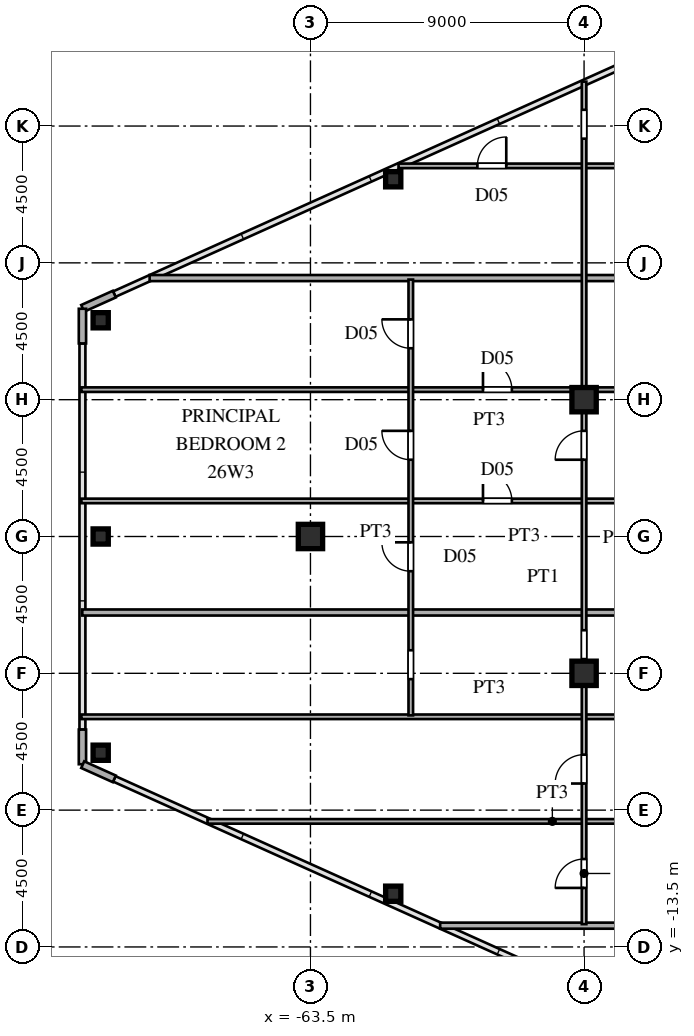
"""IFC4 building model, lengths in metres.
Left out: names, types, materials, properties, quantities, classifications, styles, units other than length and angle.
Written with IfcOpenShell. Run it as: python <this file> out.ifc"""

import sys

from ifc_helpers import new_model, si_unit, direction, frame, frame_2d, origin, origin_2d, place, context, subcontext, project, spatial, rectangle, hollow_rectangle, i_section, extrude, source, transform, mapped, element, fill, save


model = new_model("IFC4")
c1 = context("Model", 3, precision=1e-05, world=origin(), true_north=direction((0.0, 1.0)))
c2 = subcontext(c1, "Body", "Model", "MODEL_VIEW")
j1 = project(units=[si_unit("LENGTHUNIT", "METRE"), si_unit("PLANEANGLEUNIT", "RADIAN")], contexts=[c1])
p1 = place(None, origin())
s1 = spatial("IfcSite", under=j1, at=p1, CompositionType="ELEMENT")
p2 = place(p1, origin())
s2 = spatial("IfcBuilding", under=s1, at=p2, CompositionType="ELEMENT")
p3 = place(p2, frame((0.0, 0.0, 99.6)))
s3 = spatial("IfcBuildingStorey", under=s2, at=p3, CompositionType="ELEMENT", Elevation=99.6)
m1 = source(origin(), c2, "Body", "SweptSolid", [
    extrude(i_section(OverallWidth=0.8, OverallDepth=0.8, WebThickness=0.032, FlangeThickness=0.05, at=origin_2d()), origin(), (0.0, 0.0, 1.0), 3.6),
])
for number, where, z_axis, x_axis in (
    (1, (-54.5, -4.5, 0.0), (0.0, 0.0, 1.0), (1.0, 0.0, 0.0)),
    (2, (-54.5, 4.5, 0.0), (0.0, 0.0, 1.0), (1.0, 0.0, 0.0)),
    (3, (-63.5, 0.0, 0.0), (0.0, 0.0, 1.0), (1.0, 0.0, 0.0)),
):
    element("IfcColumn", number, at=place(p3, frame(where, z_axis=z_axis, x_axis=x_axis)), inside=s3, PredefinedType="COLUMN", context=c2, shape_type="MappedRepresentation", body=[
        mapped(m1, transform((0.0, 0.0, 0.0), scale=1.0)),
    ])
m2 = source(origin(), c2, "Body", "SweptSolid", [
    extrude(hollow_rectangle(XDim=0.5, YDim=0.5, WallThickness=0.02, at=origin_2d()), origin(), (0.0, 0.0, 1.0), 3.6),
])
for number, where, z_axis, x_axis in (
    (4, (-70.4, 7.112, 0.0), (0.0, 0.0, 1.0), (1.0, 0.0, 0.0)),
    (5, (-70.4, -7.112, 0.0), (0.0, 0.0, 1.0), (1.0, 0.0, 0.0)),
    (6, (-60.778, -11.749, 0.0), (0.0, 0.0, 1.0), (1.0, 0.0, 0.0)),
    (7, (-60.778, 11.749, 0.0), (0.0, 0.0, 1.0), (1.0, 0.0, 0.0)),
    (8, (-70.4, 0.0, 0.0), (0.0, 0.0, 1.0), (1.0, 0.0, 0.0)),
):
    element("IfcColumn", number, at=place(p3, frame(where, z_axis=z_axis, x_axis=x_axis)), inside=s3, PredefinedType="COLUMN", context=c2, shape_type="MappedRepresentation", body=[
        mapped(m2, transform((0.0, 0.0, 0.0), scale=1.0)),
    ])
for number, where, z_axis, x_axis in (
    (9, (-69.951, 7.972, 0.0), (0.0, 0.0, 1.0), (-0.912, -0.41, 0.0)),
    (10, (-71.0, 7.49, 0.0), (0.0, 0.0, 1.0), (0.0, -1.0, 0.0)),
    (11, (-71.0, -6.35, 0.0), (0.0, 0.0, 1.0), (0.0, -1.0, 0.0)),
    (12, (-70.991, -7.504, 0.0), (0.0, 0.0, 1.0), (0.912, -0.41, 0.0)),
):
    element("IfcWall", number, at=place(p3, frame(where, z_axis=z_axis, x_axis=x_axis)), inside=s3, PredefinedType="SOLIDWALL", context=c2, shape_type="SweptSolid", body=[
        extrude(rectangle(XDim=1.14, YDim=0.24, at=frame_2d((0.57, 0.0))), origin(), (0.0, 0.0, 1.0), 3.38),
    ])
p4 = place(p3, frame((-59.234, -12.8, 0.0), z_axis=(0.0, 0.0, 1.0), x_axis=(1.0, 0.0, 0.0)))
e13 = element("IfcWall", 13, at=p4, inside=s3, PredefinedType="PARTITIONING", context=c2, shape_type="SweptSolid", body=[
    extrude(rectangle(XDim=20.854, YDim=0.2, at=frame_2d((10.427, 0.0))), origin(), (0.0, 0.0, 1.0), 3.38),
])
p5 = place(p3, frame((-66.887, -9.37, 0.0), z_axis=(0.0, 0.0, 1.0), x_axis=(1.0, 0.0, 0.0)))
e14 = element("IfcWall", 14, at=p5, inside=s3, PredefinedType="PARTITIONING", context=c2, shape_type="SweptSolid", body=[
    extrude(rectangle(XDim=22.687, YDim=0.15, at=frame_2d((11.344, 0.0))), origin(), (0.0, 0.0, 1.0), 3.38),
])
p6 = place(p5, frame((17.087, 0.0, 0.0)))
e15 = element("IfcOpeningElement", 15, at=p6, cuts=e14, PredefinedType="OPENING", context=c2, shape_type="SweptSolid", body=[
    extrude(rectangle(XDim=0.95, YDim=2.15, at=frame_2d((0.475, 1.075))), frame((0.0, 0.085, 0.0), z_axis=(0.0, -1.0, 0.0), x_axis=(1.0, 0.0, 0.0)), (0.0, 0.0, 1.0), 0.17),
])
p7 = place(p3, frame((-71.035, -5.93, 0.0), z_axis=(0.0, 0.0, 1.0), x_axis=(1.0, 0.0, 0.0)))
e16 = element("IfcWall", 16, at=p7, inside=s3, PredefinedType="PARTITIONING", context=c2, shape_type="SweptSolid", body=[
    extrude(rectangle(XDim=26.835, YDim=0.15, at=frame_2d((13.417, 0.0))), origin(), (0.0, 0.0, 1.0), 3.38),
])
p8 = place(p7, frame((21.235, 0.0, 0.0)))
e17 = element("IfcOpeningElement", 17, at=p8, cuts=e16, PredefinedType="OPENING", context=c2, shape_type="SweptSolid", body=[
    extrude(rectangle(XDim=0.95, YDim=2.15, at=frame_2d((0.475, 1.075))), frame((0.0, 0.085, 0.0), z_axis=(0.0, -1.0, 0.0), x_axis=(1.0, 0.0, 0.0)), (0.0, 0.0, 1.0), 0.17),
])
p9 = place(p3, frame((-71.005, -2.5, 0.0), z_axis=(0.0, 0.0, 1.0), x_axis=(1.0, 0.0, 0.0)))
e18 = element("IfcWall", 18, at=p9, inside=s3, PredefinedType="PARTITIONING", context=c2, shape_type="SweptSolid", body=[
    extrude(rectangle(XDim=32.625, YDim=0.2, at=frame_2d((16.312, 0.0))), origin(), (0.0, 0.0, 1.0), 3.38),
])
p10 = place(p3, frame((-71.035, 1.17, 0.0), z_axis=(0.0, 0.0, 1.0), x_axis=(1.0, 0.0, 0.0)))
e19 = element("IfcWall", 19, at=p10, inside=s3, PredefinedType="PARTITIONING", context=c2, shape_type="SweptSolid", body=[
    extrude(rectangle(XDim=26.835, YDim=0.15, at=frame_2d((13.417, 0.0))), origin(), (0.0, 0.0, 1.0), 3.38),
])
p11 = place(p10, frame((21.235, 0.0, 0.0)))
e20 = element("IfcOpeningElement", 20, at=p11, cuts=e19, PredefinedType="OPENING", context=c2, shape_type="SweptSolid", body=[
    extrude(rectangle(XDim=0.95, YDim=2.15, at=frame_2d((0.475, 1.075))), frame((0.0, 0.085, 0.0), z_axis=(0.0, -1.0, 0.0), x_axis=(1.0, 0.0, 0.0)), (0.0, 0.0, 1.0), 0.17),
])
p12 = place(p10, frame((13.21, 0.0, 0.0)))
e21 = element("IfcOpeningElement", 21, at=p12, cuts=e19, PredefinedType="OPENING", context=c2, shape_type="SweptSolid", body=[
    extrude(rectangle(XDim=0.95, YDim=2.15, at=frame_2d((0.475, 1.075))), frame((0.0, 0.085, 0.0), z_axis=(0.0, -1.0, 0.0), x_axis=(1.0, 0.0, 0.0)), (0.0, 0.0, 1.0), 0.17),
])
p13 = place(p3, frame((-71.035, 4.83, 0.0), z_axis=(0.0, 0.0, 1.0), x_axis=(1.0, 0.0, 0.0)))
e22 = element("IfcWall", 22, at=p13, inside=s3, PredefinedType="PARTITIONING", context=c2, shape_type="SweptSolid", body=[
    extrude(rectangle(XDim=26.835, YDim=0.15, at=frame_2d((13.417, 0.0))), origin(), (0.0, 0.0, 1.0), 3.38),
])
p14 = place(p13, frame((21.235, 0.0, 0.0)))
e23 = element("IfcOpeningElement", 23, at=p14, cuts=e22, PredefinedType="OPENING", context=c2, shape_type="SweptSolid", body=[
    extrude(rectangle(XDim=0.95, YDim=2.15, at=frame_2d((0.475, 1.075))), frame((0.0, 0.085, 0.0), z_axis=(0.0, -1.0, 0.0), x_axis=(1.0, 0.0, 0.0)), (0.0, 0.0, 1.0), 0.17),
])
p15 = place(p13, frame((13.21, 0.0, 0.0)))
e24 = element("IfcOpeningElement", 24, at=p15, cuts=e22, PredefinedType="OPENING", context=c2, shape_type="SweptSolid", body=[
    extrude(rectangle(XDim=0.95, YDim=2.15, at=frame_2d((0.475, 1.075))), frame((0.0, 0.085, 0.0), z_axis=(0.0, -1.0, 0.0), x_axis=(1.0, 0.0, 0.0)), (0.0, 0.0, 1.0), 0.17),
])
p16 = place(p3, frame((-68.79, 8.5, 0.0), z_axis=(0.0, 0.0, 1.0), x_axis=(1.0, 0.0, 0.0)))
e25 = element("IfcWall", 25, at=p16, inside=s3, PredefinedType="PARTITIONING", context=c2, shape_type="SweptSolid", body=[
    extrude(rectangle(XDim=30.41, YDim=0.2, at=frame_2d((15.205, 0.0))), origin(), (0.0, 0.0, 1.0), 3.38),
])
p17 = place(p3, frame((-60.603, 12.19, 0.0), z_axis=(0.0, 0.0, 1.0), x_axis=(1.0, 0.0, 0.0)))
e26 = element("IfcWall", 26, at=p17, inside=s3, PredefinedType="PARTITIONING", context=c2, shape_type="SweptSolid", body=[
    extrude(rectangle(XDim=16.403, YDim=0.15, at=frame_2d((8.202, 0.0))), origin(), (0.0, 0.0, 1.0), 3.38),
])
p18 = place(p17, frame((10.803, 0.0, 0.0)))
e27 = element("IfcOpeningElement", 27, at=p18, cuts=e26, PredefinedType="OPENING", context=c2, shape_type="SweptSolid", body=[
    extrude(rectangle(XDim=0.95, YDim=2.15, at=frame_2d((0.475, 1.075))), frame((0.0, 0.085, 0.0), z_axis=(0.0, -1.0, 0.0), x_axis=(1.0, 0.0, 0.0)), (0.0, 0.0, 1.0), 0.17),
])
p19 = place(p17, frame((2.594, 0.0, 0.0)))
e28 = element("IfcOpeningElement", 28, at=p19, cuts=e26, PredefinedType="OPENING", context=c2, shape_type="SweptSolid", body=[
    extrude(rectangle(XDim=0.95, YDim=2.15, at=frame_2d((0.475, 1.075))), frame((0.0, 0.085, 0.0), z_axis=(0.0, -1.0, 0.0), x_axis=(1.0, 0.0, 0.0)), (0.0, 0.0, 1.0), 0.17),
])
p20 = place(p3, frame((-60.2, -5.883, 0.0), z_axis=(0.0, 0.0, 1.0), x_axis=(0.0, 1.0, 0.0)))
e29 = element("IfcWall", 29, at=p20, inside=s3, PredefinedType="PARTITIONING", context=c2, shape_type="SweptSolid", body=[
    extrude(rectangle(XDim=14.333, YDim=0.15, at=frame_2d((7.167, 0.0))), origin(), (0.0, 0.0, 1.0), 3.38),
])
p21 = place(p20, frame((1.191, 0.0, 0.0)))
e30 = element("IfcOpeningElement", 30, at=p21, cuts=e29, PredefinedType="OPENING", context=c2, shape_type="SweptSolid", body=[
    extrude(rectangle(XDim=0.95, YDim=2.15, at=frame_2d((0.475, 1.075))), frame((0.0, 0.085, 0.0), z_axis=(0.0, -1.0, 0.0), x_axis=(1.0, 0.0, 0.0)), (0.0, 0.0, 1.0), 0.17),
])
p22 = place(p20, frame((4.741, 0.0, 0.0)))
e31 = element("IfcOpeningElement", 31, at=p22, cuts=e29, PredefinedType="OPENING", context=c2, shape_type="SweptSolid", body=[
    extrude(rectangle(XDim=0.95, YDim=2.15, at=frame_2d((0.475, 1.075))), frame((0.0, 0.085, 0.0), z_axis=(0.0, -1.0, 0.0), x_axis=(1.0, 0.0, 0.0)), (0.0, 0.0, 1.0), 0.17),
])
p23 = place(p20, frame((8.408, 0.0, 0.0)))
e32 = element("IfcOpeningElement", 32, at=p23, cuts=e29, PredefinedType="OPENING", context=c2, shape_type="SweptSolid", body=[
    extrude(rectangle(XDim=0.95, YDim=2.15, at=frame_2d((0.475, 1.075))), frame((0.0, 0.085, 0.0), z_axis=(0.0, -1.0, 0.0), x_axis=(1.0, 0.0, 0.0)), (0.0, 0.0, 1.0), 0.17),
])
p24 = place(p20, frame((12.075, 0.0, 0.0)))
e33 = element("IfcOpeningElement", 33, at=p24, cuts=e29, PredefinedType="OPENING", context=c2, shape_type="SweptSolid", body=[
    extrude(rectangle(XDim=0.95, YDim=2.15, at=frame_2d((0.475, 1.075))), frame((0.0, 0.085, 0.0), z_axis=(0.0, -1.0, 0.0), x_axis=(1.0, 0.0, 0.0)), (0.0, 0.0, 1.0), 0.17),
])
p25 = place(p3, frame((-54.5, -12.75, 0.0), z_axis=(0.0, 0.0, 1.0), x_axis=(0.0, 1.0, 0.0)))
e34 = element("IfcWall", 34, at=p25, inside=s3, PredefinedType="PARTITIONING", context=c2, shape_type="SweptSolid", body=[
    extrude(rectangle(XDim=27.71, YDim=0.15, at=frame_2d((13.855, 0.0))), origin(), (0.0, 0.0, 1.0), 2.68),
])
p26 = place(p25, frame((4.625, 0.0, 0.0)))
e35 = element("IfcOpeningElement", 35, at=p26, cuts=e34, PredefinedType="OPENING", context=c2, shape_type="SweptSolid", body=[
    extrude(rectangle(XDim=0.95, YDim=2.15, at=frame_2d((0.475, 1.075))), frame((0.0, 0.085, 0.0), z_axis=(0.0, -1.0, 0.0), x_axis=(1.0, 0.0, 0.0)), (0.0, 0.0, 1.0), 0.17),
])
p27 = place(p25, frame((1.192, 0.0, 0.0)))
e36 = element("IfcOpeningElement", 36, at=p27, cuts=e34, PredefinedType="OPENING", context=c2, shape_type="SweptSolid", body=[
    extrude(rectangle(XDim=0.95, YDim=2.15, at=frame_2d((0.475, 1.075))), frame((0.0, 0.085, 0.0), z_axis=(0.0, -1.0, 0.0), x_axis=(1.0, 0.0, 0.0)), (0.0, 0.0, 1.0), 0.17),
])
p28 = place(p25, frame((8.717, 0.0, 0.0)))
e37 = element("IfcOpeningElement", 37, at=p28, cuts=e34, PredefinedType="OPENING", context=c2, shape_type="SweptSolid", body=[
    extrude(rectangle(XDim=0.95, YDim=2.15, at=frame_2d((0.475, 1.075))), frame((0.0, 0.085, 0.0), z_axis=(0.0, -1.0, 0.0), x_axis=(1.0, 0.0, 0.0)), (0.0, 0.0, 1.0), 0.17),
])
p29 = place(p25, frame((15.275, 0.0, 0.0)))
e38 = element("IfcOpeningElement", 38, at=p29, cuts=e34, PredefinedType="OPENING", context=c2, shape_type="SweptSolid", body=[
    extrude(rectangle(XDim=0.95, YDim=2.15, at=frame_2d((0.475, 1.075))), frame((0.0, 0.085, 0.0), z_axis=(0.0, -1.0, 0.0), x_axis=(1.0, 0.0, 0.0)), (0.0, 0.0, 1.0), 0.17),
])
p30 = place(p25, frame((25.835, 0.0, 0.0)))
e39 = element("IfcOpeningElement", 39, at=p30, cuts=e34, PredefinedType="OPENING", context=c2, shape_type="SweptSolid", body=[
    extrude(rectangle(XDim=0.95, YDim=2.15, at=frame_2d((0.475, 1.075))), frame((0.0, 0.085, 0.0), z_axis=(0.0, -1.0, 0.0), x_axis=(1.0, 0.0, 0.0)), (0.0, 0.0, 1.0), 0.17),
])
m3 = source(origin(), c2, "Body", "SweptSolid", [
    extrude(rectangle(XDim=0.95, YDim=2.15, at=frame_2d((0.475, 1.075))), frame((0.0, 0.025, 0.0), z_axis=(0.0, -1.0, 0.0), x_axis=(1.0, 0.0, 0.0)), (0.0, 0.0, 1.0), 0.05),
])
p31 = place(p12, origin())
e40 = element("IfcDoor", 40, at=p31, inside=s3, OperationType="SINGLE_SWING_LEFT", PredefinedType="DOOR", context=c2, shape_type="MappedRepresentation", body=[
    mapped(m3, transform((0.0, 0.0, 0.0), scale=1.0)),
])
fill(e21, e40)
p32 = place(p15, origin())
e41 = element("IfcDoor", 41, at=p32, inside=s3, OperationType="SINGLE_SWING_LEFT", PredefinedType="DOOR", context=c2, shape_type="MappedRepresentation", body=[
    mapped(m3, transform((0.0, 0.0, 0.0), scale=1.0)),
])
fill(e24, e41)
p33 = place(p19, origin())
e42 = element("IfcDoor", 42, at=p33, inside=s3, OperationType="SINGLE_SWING_RIGHT", PredefinedType="DOOR", context=c2, shape_type="MappedRepresentation", body=[
    mapped(m3, transform((0.0, 0.0, 0.0), scale=1.0)),
])
fill(e28, e42)
p34 = place(p22, origin())
e43 = element("IfcDoor", 43, at=p34, inside=s3, OperationType="SINGLE_SWING_RIGHT", PredefinedType="DOOR", context=c2, shape_type="MappedRepresentation", body=[
    mapped(m3, transform((0.0, 0.0, 0.0), scale=1.0)),
])
fill(e31, e43)
p35 = place(p23, origin())
e44 = element("IfcDoor", 44, at=p35, inside=s3, OperationType="SINGLE_SWING_RIGHT", PredefinedType="DOOR", context=c2, shape_type="MappedRepresentation", body=[
    mapped(m3, transform((0.0, 0.0, 0.0), scale=1.0)),
])
fill(e32, e44)
p36 = place(p24, origin())
e45 = element("IfcDoor", 45, at=p36, inside=s3, OperationType="SINGLE_SWING_RIGHT", PredefinedType="DOOR", context=c2, shape_type="MappedRepresentation", body=[
    mapped(m3, transform((0.0, 0.0, 0.0), scale=1.0)),
])
fill(e33, e45)
p37 = place(p26, origin())
e46 = element("IfcDoor", 46, at=p37, inside=s3, OperationType="SINGLE_SWING_LEFT", PredefinedType="DOOR", context=c2, shape_type="MappedRepresentation", body=[
    mapped(m3, transform((0.0, 0.0, 0.0), scale=1.0)),
])
fill(e35, e46)
p38 = place(p27, origin())
e47 = element("IfcDoor", 47, at=p38, inside=s3, OperationType="SINGLE_SWING_LEFT", PredefinedType="DOOR", context=c2, shape_type="MappedRepresentation", body=[
    mapped(m3, transform((0.0, 0.0, 0.0), scale=1.0)),
])
fill(e36, e47)
p39 = place(p29, origin())
e48 = element("IfcDoor", 48, at=p39, inside=s3, OperationType="SINGLE_SWING_LEFT", PredefinedType="DOOR", context=c2, shape_type="MappedRepresentation", body=[
    mapped(m3, transform((0.0, 0.0, 0.0), scale=1.0)),
])
fill(e38, e48)
save(model, sys.argv[1])
